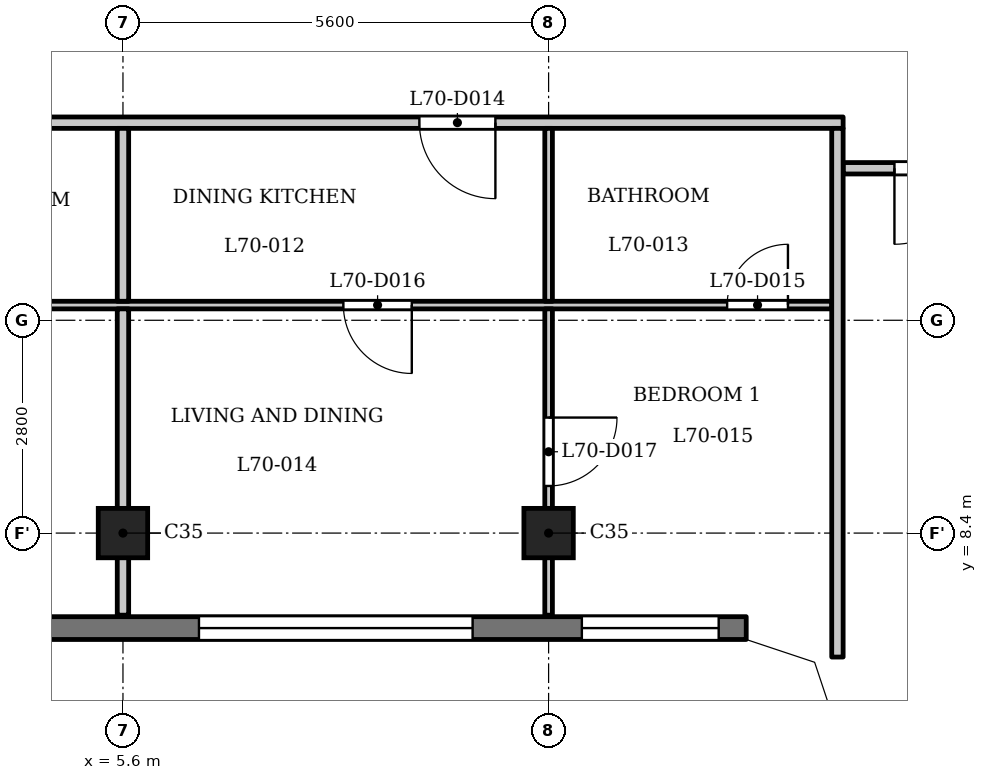
"""IFC4 building model, lengths in metres.
Left out: names, types, materials, properties, quantities, classifications, styles, units other than length and angle.
Written with IfcOpenShell. Run it as: python <this file> out.ifc"""

import sys

from ifc_helpers import new_model, si_unit, direction, frame, frame_2d, origin, origin_2d, place, context, subcontext, project, spatial, polyline, rectangle, outline, extrude, element, fill, save


model = new_model("IFC4")
c1 = context("Model", 3, precision=1e-05, world=origin(), true_north=direction((0.0, 1.0)))
c2 = subcontext(c1, "Body", "Model", "MODEL_VIEW")
j1 = project(units=[si_unit("LENGTHUNIT", "METRE"), si_unit("PLANEANGLEUNIT", "RADIAN")], contexts=[c1])
p1 = place(None, origin())
s1 = spatial("IfcSite", under=j1, at=p1, CompositionType="ELEMENT")
p2 = place(p1, origin())
s2 = spatial("IfcBuilding", under=s1, at=p2, CompositionType="ELEMENT")
p3 = place(p2, frame((0.0, 0.0, 269.7)))
s3 = spatial("IfcBuildingStorey", under=s2, at=p3, CompositionType="ELEMENT", Elevation=269.7)
for number, where, z_axis, x_axis in (
    (1, (5.6, 8.4, 0.0), (0.0, 0.0, 1.0), (1.0, 0.0, 0.0)),
    (2, (11.2, 8.4, 0.0), (0.0, 0.0, 1.0), (1.0, 0.0, 0.0)),
):
    element("IfcColumn", number, at=place(p3, frame(where, z_axis=z_axis, x_axis=x_axis)), inside=s3, PredefinedType="COLUMN", context=c2, shape_type="SweptSolid", body=[
        extrude(rectangle(XDim=0.65, YDim=0.65, at=origin_2d()), origin(), (0.0, 0.0, 1.0), 3.5),
    ])
p4 = place(p3, frame((-13.8, 7.15, 0.0), z_axis=(0.0, 0.0, 1.0), x_axis=(1.0, 0.0, 0.0)))
e3 = element("IfcWall", 3, at=p4, inside=s3, PredefinedType="SOLIDWALL", context=c2, shape_type="SweptSolid", body=[
    extrude(rectangle(XDim=27.6, YDim=0.3, at=frame_2d((13.8, 0.0))), origin(), (0.0, 0.0, 1.0), 3.2),
])
p5 = place(p4, frame((0.363, 0.0, 0.9)))
e4 = element("IfcOpeningElement", 4, at=p5, cuts=e3, PredefinedType="OPENING", context=c2, shape_type="SweptSolid", body=[
    extrude(rectangle(XDim=1.8, YDim=1.25, at=frame_2d((0.9, 0.625))), frame((0.0, 0.16, 0.0), z_axis=(0.0, -1.0, 0.0), x_axis=(1.0, 0.0, 0.0)), (0.0, 0.0, 1.0), 0.32),
])
p6 = place(p4, frame((3.6, 0.0, 1.2)))
e5 = element("IfcOpeningElement", 5, at=p6, cuts=e3, PredefinedType="OPENING", context=c2, shape_type="SweptSolid", body=[
    extrude(rectangle(XDim=3.6, YDim=0.95, at=frame_2d((1.8, 0.475))), frame((0.0, 0.16, 0.0), z_axis=(0.0, -1.0, 0.0), x_axis=(1.0, 0.0, 0.0)), (0.0, 0.0, 1.0), 0.32),
])
p7 = place(p4, frame((9.2, 0.0, 1.2)))
e6 = element("IfcOpeningElement", 6, at=p7, cuts=e3, PredefinedType="OPENING", context=c2, shape_type="SweptSolid", body=[
    extrude(rectangle(XDim=3.6, YDim=0.95, at=frame_2d((1.8, 0.475))), frame((0.0, 0.16, 0.0), z_axis=(0.0, -1.0, 0.0), x_axis=(1.0, 0.0, 0.0)), (0.0, 0.0, 1.0), 0.32),
])
p8 = place(p4, frame((14.8, 0.0, 1.2)))
e7 = element("IfcOpeningElement", 7, at=p8, cuts=e3, PredefinedType="OPENING", context=c2, shape_type="SweptSolid", body=[
    extrude(rectangle(XDim=3.6, YDim=0.95, at=frame_2d((1.8, 0.475))), frame((0.0, 0.16, 0.0), z_axis=(0.0, -1.0, 0.0), x_axis=(1.0, 0.0, 0.0)), (0.0, 0.0, 1.0), 0.32),
])
p9 = place(p4, frame((20.4, 0.0, 1.2)))
e8 = element("IfcOpeningElement", 8, at=p9, cuts=e3, PredefinedType="OPENING", context=c2, shape_type="SweptSolid", body=[
    extrude(rectangle(XDim=3.6, YDim=0.95, at=frame_2d((1.8, 0.475))), frame((0.0, 0.16, 0.0), z_axis=(0.0, -1.0, 0.0), x_axis=(1.0, 0.0, 0.0)), (0.0, 0.0, 1.0), 0.32),
])
p10 = place(p4, frame((25.438, 0.0, 0.9)))
e9 = element("IfcOpeningElement", 9, at=p10, cuts=e3, PredefinedType="OPENING", context=c2, shape_type="SweptSolid", body=[
    extrude(rectangle(XDim=1.8, YDim=1.25, at=frame_2d((0.9, 0.625))), frame((0.0, 0.16, 0.0), z_axis=(0.0, -1.0, 0.0), x_axis=(1.0, 0.0, 0.0)), (0.0, 0.0, 1.0), 0.32),
])
p11 = place(p3, frame((-14.925, 11.4, 0.0), z_axis=(0.0, 0.0, 1.0), x_axis=(1.0, 0.0, 0.0)))
e10 = element("IfcWall", 10, at=p11, inside=s3, PredefinedType="PARTITIONING", context=c2, shape_type="SweptSolid", body=[
    extrude(rectangle(XDim=29.85, YDim=0.1, at=frame_2d((14.925, 0.0))), origin(), (0.0, 0.0, 1.0), 3.2),
])
p12 = place(p11, frame((13.475, 0.0, 0.0)))
e11 = element("IfcOpeningElement", 11, at=p12, cuts=e10, PredefinedType="OPENING", context=c2, shape_type="SweptSolid", body=[
    extrude(rectangle(XDim=0.9, YDim=2.1, at=frame_2d((0.45, 1.05))), frame((0.0, 0.06, 0.0), z_axis=(0.0, -1.0, 0.0), x_axis=(1.0, 0.0, 0.0)), (0.0, 0.0, 1.0), 0.12),
])
p13 = place(p11, frame((4.625, 0.0, 0.0)))
e12 = element("IfcOpeningElement", 12, at=p13, cuts=e10, PredefinedType="OPENING", context=c2, shape_type="SweptSolid", body=[
    extrude(rectangle(XDim=0.9, YDim=2.1, at=frame_2d((0.45, 1.05))), frame((0.0, 0.06, 0.0), z_axis=(0.0, -1.0, 0.0), x_axis=(1.0, 0.0, 0.0)), (0.0, 0.0, 1.0), 0.12),
])
p14 = place(p11, frame((18.075, 0.0, 0.0)))
e13 = element("IfcOpeningElement", 13, at=p14, cuts=e10, PredefinedType="OPENING", context=c2, shape_type="SweptSolid", body=[
    extrude(rectangle(XDim=0.8, YDim=2.1, at=frame_2d((0.4, 1.05))), frame((0.0, 0.06, 0.0), z_axis=(0.0, -1.0, 0.0), x_axis=(1.0, 0.0, 0.0)), (0.0, 0.0, 1.0), 0.12),
])
p15 = place(p11, frame((15.575, 0.0, 0.0)))
e14 = element("IfcOpeningElement", 14, at=p15, cuts=e10, PredefinedType="OPENING", context=c2, shape_type="SweptSolid", body=[
    extrude(rectangle(XDim=0.9, YDim=2.1, at=frame_2d((0.45, 1.05))), frame((0.0, 0.06, 0.0), z_axis=(0.0, -1.0, 0.0), x_axis=(1.0, 0.0, 0.0)), (0.0, 0.0, 1.0), 0.12),
])
p16 = place(p11, frame((28.474, 0.0, 0.0)))
e15 = element("IfcOpeningElement", 15, at=p16, cuts=e10, PredefinedType="OPENING", context=c2, shape_type="SweptSolid", body=[
    extrude(rectangle(XDim=0.8, YDim=2.1, at=frame_2d((0.4, 1.05))), frame((0.0, 0.06, 0.0), z_axis=(0.0, -1.0, 0.0), x_axis=(1.0, 0.0, 0.0)), (0.0, 0.0, 1.0), 0.12),
])
p17 = place(p11, frame((23.425, 0.0, 0.0)))
e16 = element("IfcOpeningElement", 16, at=p17, cuts=e10, PredefinedType="OPENING", context=c2, shape_type="SweptSolid", body=[
    extrude(rectangle(XDim=0.9, YDim=2.1, at=frame_2d((0.45, 1.05))), frame((0.0, 0.06, 0.0), z_axis=(0.0, -1.0, 0.0), x_axis=(1.0, 0.0, 0.0)), (0.0, 0.0, 1.0), 0.12),
])
p18 = place(p3, frame((15.075, 13.2, 0.0), z_axis=(0.0, 0.0, 1.0), x_axis=(1.0, 0.0, 0.0)))
e17 = element("IfcWall", 17, at=p18, inside=s3, PredefinedType="PARTITIONING", context=c2, shape_type="SweptSolid", body=[
    extrude(rectangle(XDim=2.325, YDim=0.15, at=frame_2d((1.163, 0.0))), origin(), (0.0, 0.0, 1.0), 3.2),
])
p19 = place(p18, frame((0.675, 0.0, 0.0)))
e18 = element("IfcOpeningElement", 18, at=p19, cuts=e17, PredefinedType="OPENING", context=c2, shape_type="SweptSolid", body=[
    extrude(rectangle(XDim=1.0, YDim=2.1, at=frame_2d((0.5, 1.05))), frame((0.0, 0.085, 0.0), z_axis=(0.0, -1.0, 0.0), x_axis=(1.0, 0.0, 0.0)), (0.0, 0.0, 1.0), 0.17),
])
p20 = place(p3, frame((-15.075, 13.8, 0.0), z_axis=(0.0, 0.0, 1.0), x_axis=(1.0, 0.0, 0.0)))
e19 = element("IfcWall", 19, at=p20, inside=s3, PredefinedType="PARTITIONING", context=c2, shape_type="SweptSolid", body=[
    extrude(rectangle(XDim=30.15, YDim=0.15, at=frame_2d((15.075, 0.0))), origin(), (0.0, 0.0, 1.0), 3.2),
])
p21 = place(p20, frame((10.125, 0.0, 0.0)))
e20 = element("IfcOpeningElement", 20, at=p21, cuts=e19, PredefinedType="OPENING", context=c2, shape_type="SweptSolid", body=[
    extrude(rectangle(XDim=1.0, YDim=2.1, at=frame_2d((0.5, 1.05))), frame((0.0, 0.085, 0.0), z_axis=(0.0, -1.0, 0.0), x_axis=(1.0, 0.0, 0.0)), (0.0, 0.0, 1.0), 0.17),
])
p22 = place(p20, frame((15.725, 0.0, 0.0)))
e21 = element("IfcOpeningElement", 21, at=p22, cuts=e19, PredefinedType="OPENING", context=c2, shape_type="SweptSolid", body=[
    extrude(rectangle(XDim=1.0, YDim=2.1, at=frame_2d((0.5, 1.05))), frame((0.0, 0.085, 0.0), z_axis=(0.0, -1.0, 0.0), x_axis=(1.0, 0.0, 0.0)), (0.0, 0.0, 1.0), 0.17),
])
p23 = place(p20, frame((24.575, 0.0, 0.0)))
e22 = element("IfcOpeningElement", 22, at=p23, cuts=e19, PredefinedType="OPENING", context=c2, shape_type="SweptSolid", body=[
    extrude(rectangle(XDim=1.0, YDim=2.1, at=frame_2d((0.5, 1.05))), frame((0.0, 0.085, 0.0), z_axis=(0.0, -1.0, 0.0), x_axis=(1.0, 0.0, 0.0)), (0.0, 0.0, 1.0), 0.17),
])
p24 = place(p3, frame((5.6, 7.32, 0.0), z_axis=(0.0, 0.0, 1.0), x_axis=(0.0, 1.0, 0.0)))
e23 = element("IfcWall", 23, at=p24, inside=s3, PredefinedType="PARTITIONING", context=c2, shape_type="SweptSolid", body=[
    extrude(rectangle(XDim=4.03, YDim=0.15, at=frame_2d((2.015, 0.0))), origin(), (0.0, 0.0, 1.0), 3.2),
])
p25 = place(p3, frame((5.6, 11.45, 0.0), z_axis=(0.0, 0.0, 1.0), x_axis=(0.0, 1.0, 0.0)))
e24 = element("IfcWall", 24, at=p25, inside=s3, PredefinedType="PARTITIONING", context=c2, shape_type="SweptSolid", body=[
    extrude(rectangle(XDim=2.275, YDim=0.15, at=frame_2d((1.138, 0.0))), origin(), (0.0, 0.0, 1.0), 3.2),
])
p26 = place(p3, frame((11.2, 7.32, 0.0), z_axis=(0.0, 0.0, 1.0), x_axis=(0.0, 1.0, 0.0)))
e25 = element("IfcWall", 25, at=p26, inside=s3, PredefinedType="PARTITIONING", context=c2, shape_type="SweptSolid", body=[
    extrude(rectangle(XDim=4.03, YDim=0.1, at=frame_2d((2.015, 0.0))), origin(), (0.0, 0.0, 1.0), 3.2),
])
p27 = place(p26, frame((1.7, 0.0, 0.0)))
e26 = element("IfcOpeningElement", 26, at=p27, cuts=e25, PredefinedType="OPENING", context=c2, shape_type="SweptSolid", body=[
    extrude(rectangle(XDim=0.9, YDim=2.1, at=frame_2d((0.45, 1.05))), frame((0.0, 0.06, 0.0), z_axis=(0.0, -1.0, 0.0), x_axis=(1.0, 0.0, 0.0)), (0.0, 0.0, 1.0), 0.12),
])
p28 = place(p3, frame((11.2, 11.45, 0.0), z_axis=(0.0, 0.0, 1.0), x_axis=(0.0, 1.0, 0.0)))
e27 = element("IfcWall", 27, at=p28, inside=s3, PredefinedType="PARTITIONING", context=c2, shape_type="SweptSolid", body=[
    extrude(rectangle(XDim=2.275, YDim=0.1, at=frame_2d((1.138, 0.0))), origin(), (0.0, 0.0, 1.0), 3.2),
])
p29 = place(p3, frame((15.0, 6.769, 0.0), z_axis=(0.0, 0.0, 1.0), x_axis=(0.0, 1.0, 0.0)))
e28 = element("IfcWall", 28, at=p29, inside=s3, PredefinedType="PARTITIONING", context=c2, shape_type="SweptSolid", body=[
    extrude(rectangle(XDim=6.956, YDim=0.15, at=frame_2d((3.478, 0.0))), origin(), (0.0, 0.0, 1.0), 3.2),
])
p30 = place(p3, origin())
e29 = element("IfcWall", 29, at=p30, inside=s3, PredefinedType="SOLIDWALL", context=c2, shape_type="SweptSolid", body=[
    extrude(outline(polyline([(14.937, 6.937), (13.849, 7.3), (13.8, 7.3), (13.8, 7.0), (14.7, 6.7), (15.0, 5.8), (15.3, 5.8), (15.3, 5.849), (14.937, 6.937)])), origin(), (0.0, 0.0, 1.0), 3.2),
])
p31 = place(p19, origin())
e30 = element("IfcDoor", 30, at=p31, inside=s3, OperationType="SINGLE_SWING_LEFT", PredefinedType="DOOR", context=c2, shape_type="SweptSolid", body=[
    extrude(rectangle(XDim=1.0, YDim=2.1, at=frame_2d((0.5, 1.05))), frame((0.0, 0.025, 0.0), z_axis=(0.0, -1.0, 0.0), x_axis=(1.0, 0.0, 0.0)), (0.0, 0.0, 1.0), 0.05),
])
fill(e18, e30)
p32 = place(p23, origin())
e31 = element("IfcDoor", 31, at=p32, inside=s3, OperationType="SINGLE_SWING_RIGHT", PredefinedType="DOOR", context=c2, shape_type="SweptSolid", body=[
    extrude(rectangle(XDim=1.0, YDim=2.1, at=frame_2d((0.5, 1.05))), frame((0.0, 0.025, 0.0), z_axis=(0.0, -1.0, 0.0), x_axis=(1.0, 0.0, 0.0)), (0.0, 0.0, 1.0), 0.05),
])
fill(e22, e31)
p33 = place(p16, origin())
e32 = element("IfcDoor", 32, at=p33, inside=s3, OperationType="SINGLE_SWING_LEFT", PredefinedType="DOOR", context=c2, shape_type="SweptSolid", body=[
    extrude(rectangle(XDim=0.8, YDim=2.1, at=frame_2d((0.4, 1.05))), frame((0.0, 0.025, 0.0), z_axis=(0.0, -1.0, 0.0), x_axis=(1.0, 0.0, 0.0)), (0.0, 0.0, 1.0), 0.05),
])
fill(e15, e32)
p34 = place(p17, origin())
e33 = element("IfcDoor", 33, at=p34, inside=s3, OperationType="SINGLE_SWING_RIGHT", PredefinedType="DOOR", context=c2, shape_type="SweptSolid", body=[
    extrude(rectangle(XDim=0.9, YDim=2.1, at=frame_2d((0.45, 1.05))), frame((0.0, 0.025, 0.0), z_axis=(0.0, -1.0, 0.0), x_axis=(1.0, 0.0, 0.0)), (0.0, 0.0, 1.0), 0.05),
])
fill(e16, e33)
p35 = place(p27, origin())
e34 = element("IfcDoor", 34, at=p35, inside=s3, OperationType="SINGLE_SWING_RIGHT", PredefinedType="DOOR", context=c2, shape_type="SweptSolid", body=[
    extrude(rectangle(XDim=0.9, YDim=2.1, at=frame_2d((0.45, 1.05))), frame((0.0, 0.025, 0.0), z_axis=(0.0, -1.0, 0.0), x_axis=(1.0, 0.0, 0.0)), (0.0, 0.0, 1.0), 0.05),
])
fill(e26, e34)
p36 = place(p9, origin())
e35 = element("IfcWindow", 35, at=p36, inside=s3, PartitioningType="SINGLE_PANEL", PredefinedType="WINDOW", context=c2, shape_type="SweptSolid", body=[
    extrude(rectangle(XDim=3.6, YDim=0.95, at=frame_2d((1.8, 0.475))), frame((0.0, 0.03, 0.0), z_axis=(0.0, -1.0, 0.0), x_axis=(1.0, 0.0, 0.0)), (0.0, 0.0, 1.0), 0.06),
])
fill(e8, e35)
p37 = place(p10, origin())
e36 = element("IfcWindow", 36, at=p37, inside=s3, PartitioningType="SINGLE_PANEL", PredefinedType="WINDOW", context=c2, shape_type="SweptSolid", body=[
    extrude(rectangle(XDim=1.8, YDim=1.25, at=frame_2d((0.9, 0.625))), frame((0.0, 0.03, 0.0), z_axis=(0.0, -1.0, 0.0), x_axis=(1.0, 0.0, 0.0)), (0.0, 0.0, 1.0), 0.06),
])
fill(e9, e36)
save(model, sys.argv[1])
